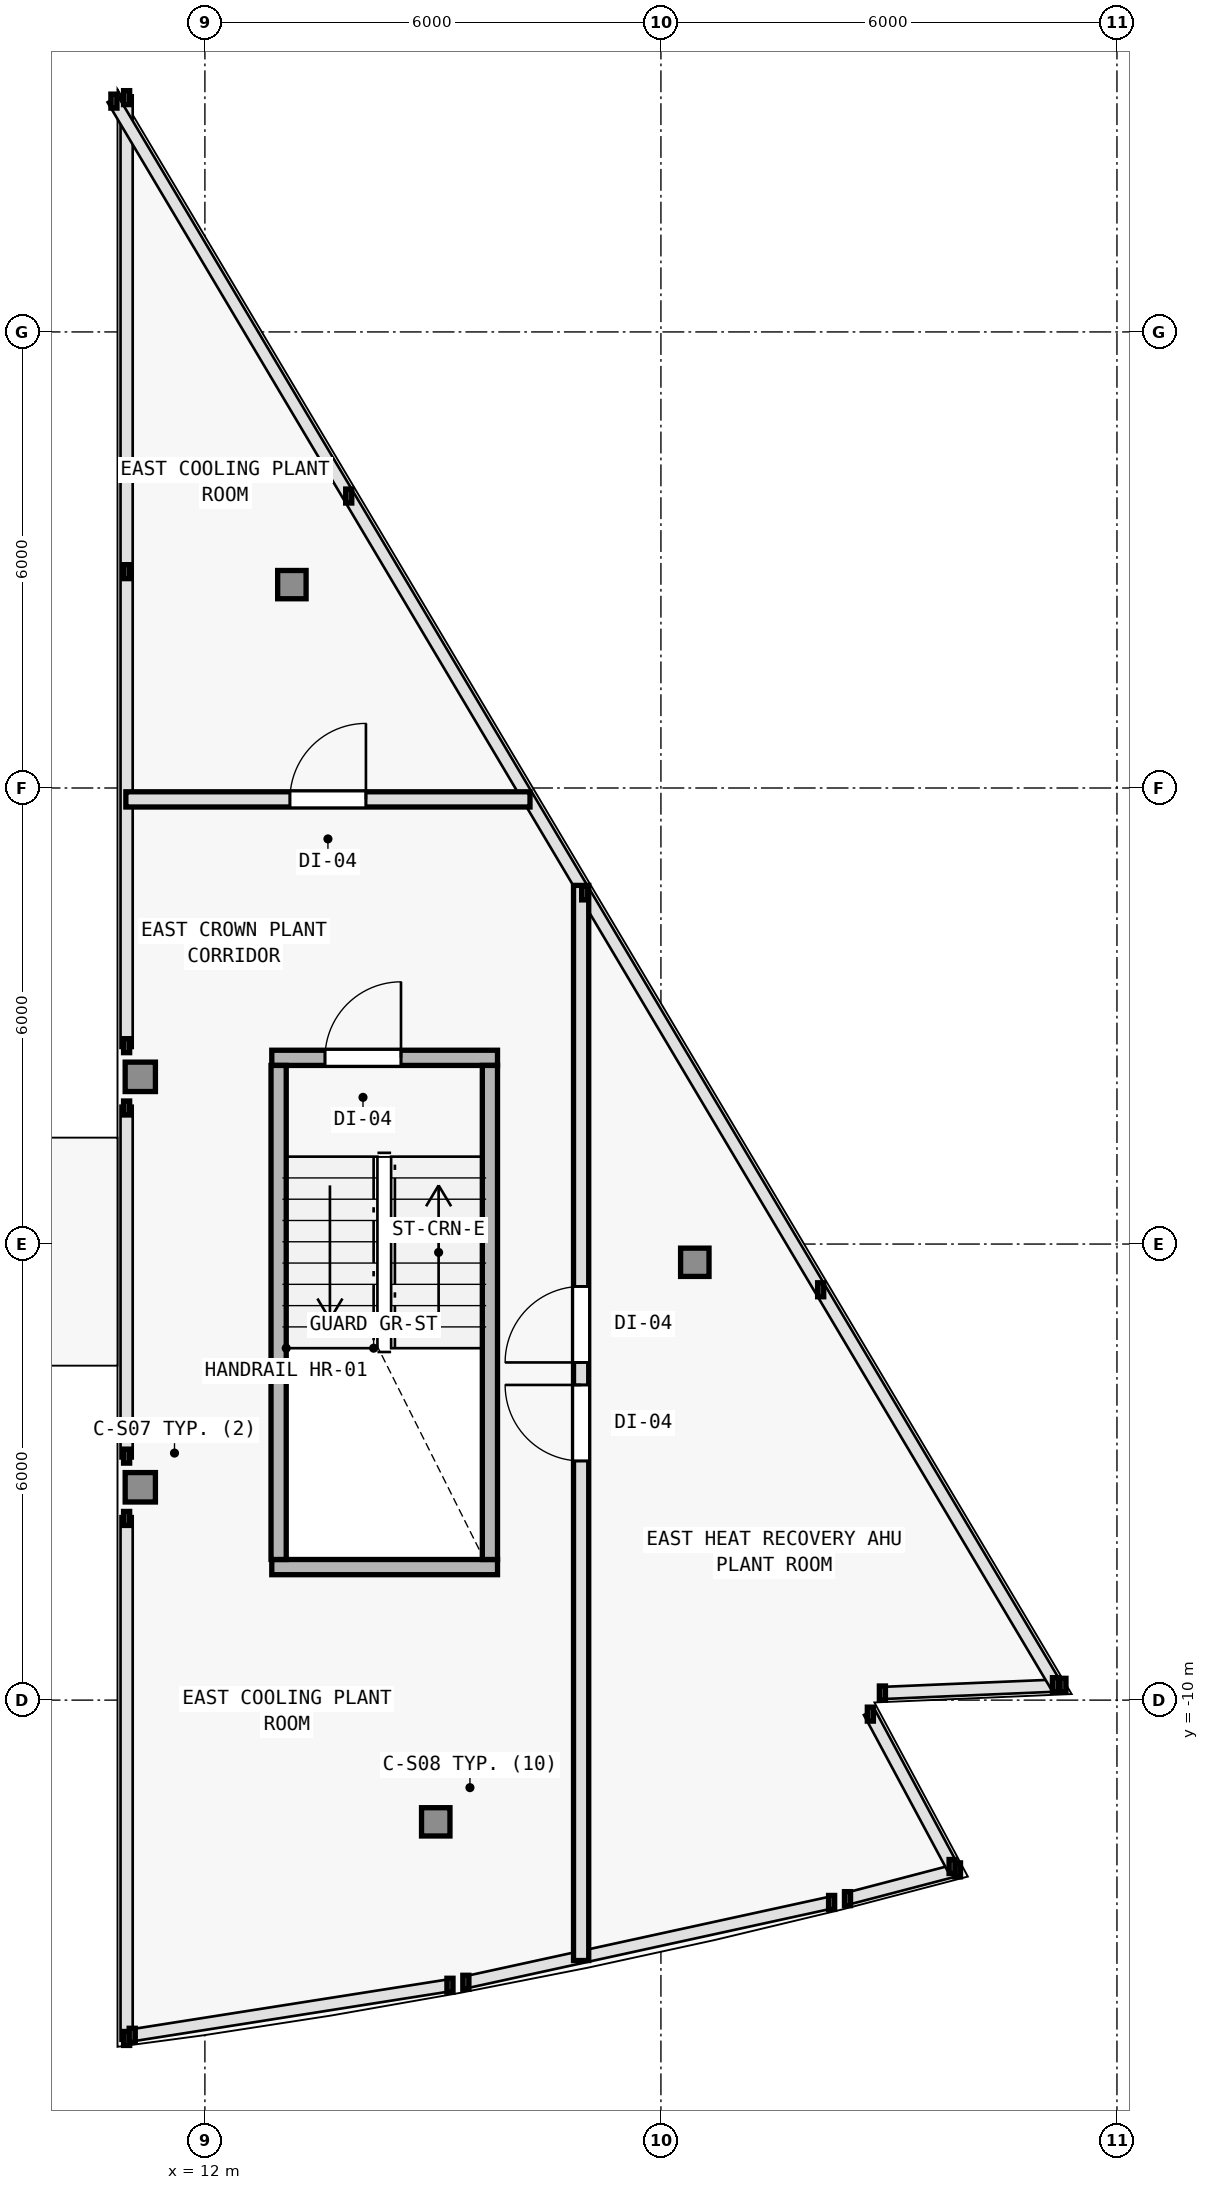
"""IFC4 building model, lengths in metres.
Left out: names, types, materials, properties, quantities, classifications, styles, units other than length and angle.
Written with IfcOpenShell. Run it as: python <this file> out.ifc"""

import sys

from ifc_helpers import new_model, si_unit, direction, frame, frame_2d, origin, origin_2d, place, context, subcontext, project, spatial, rectangle, i_section, extrude, element, fill, save


model = new_model("IFC4")
c1 = context("Model", 3, precision=1e-05, world=origin(), true_north=direction((0.0, 1.0)))
c2 = subcontext(c1, "Body", "Model", "MODEL_VIEW")
j1 = project(units=[si_unit("LENGTHUNIT", "METRE"), si_unit("PLANEANGLEUNIT", "RADIAN")], contexts=[c1])
p1 = place(None, origin())
s1 = spatial("IfcSite", under=j1, at=p1, CompositionType="ELEMENT")
p2 = place(p1, origin())
s2 = spatial("IfcBuilding", under=s1, at=p2, CompositionType="ELEMENT")
p3 = place(p2, frame((0.0, 0.0, 301.2)))
s3 = spatial("IfcBuildingStorey", under=s2, at=p3, CompositionType="ELEMENT", Elevation=301.2)
for number, where, z_axis, x_axis in (
    (1, (11.15, -7.2, 0.0), (0.0, 0.0, 1.0), (1.0, 0.0, 0.0)),
    (2, (11.15, -1.8, 0.0), (0.0, 0.0, 1.0), (1.0, 0.0, 0.0)),
):
    element("IfcColumn", number, at=place(p3, frame(where, z_axis=z_axis, x_axis=x_axis)), inside=s3, PredefinedType="COLUMN", context=c2, shape_type="SweptSolid", body=[
        extrude(i_section(OverallWidth=0.398, OverallDepth=0.387, WebThickness=0.013, FlangeThickness=0.022, FilletRadius=0.015, at=origin_2d()), origin(), (0.0, 0.0, 1.0), 3.6),
    ])
for number, where, z_axis, x_axis in (
    (3, (15.037, -11.602, 0.0), (0.0, 0.0, 1.0), (1.0, 0.0, 0.0)),
    (4, (18.446, -4.24, 0.0), (0.0, 0.0, 1.0), (1.0, 0.0, 0.0)),
    (5, (13.144, 4.676, 0.0), (0.0, 0.0, 1.0), (1.0, 0.0, 0.0)),
):
    element("IfcColumn", number, at=place(p3, frame(where, z_axis=z_axis, x_axis=x_axis)), inside=s3, PredefinedType="COLUMN", context=c2, shape_type="SweptSolid", body=[
        extrude(i_section(OverallWidth=0.374, OverallDepth=0.372, WebThickness=0.012, FlangeThickness=0.02, FilletRadius=0.015, at=origin_2d()), origin(), (0.0, 0.0, 1.0), 3.6),
    ])
p4 = place(p3, frame((12.88, -8.25, 0.0), z_axis=(0.0, 0.0, 1.0), x_axis=(1.0, 0.0, 0.0)))
e6 = element("IfcWall", 6, at=p4, inside=s3, PredefinedType="SOLIDWALL", context=c2, shape_type="SweptSolid", body=[
    extrude(rectangle(XDim=2.97, YDim=0.2, at=frame_2d((1.485, 0.0))), origin(), (0.0, 0.0, 1.0), 3.34),
])
p5 = place(p3, frame((12.88, -1.55, 0.0), z_axis=(0.0, 0.0, 1.0), x_axis=(1.0, 0.0, 0.0)))
e7 = element("IfcWall", 7, at=p5, inside=s3, PredefinedType="SOLIDWALL", context=c2, shape_type="SweptSolid", body=[
    extrude(rectangle(XDim=2.97, YDim=0.2, at=frame_2d((1.485, 0.0))), origin(), (0.0, 0.0, 1.0), 3.34),
])
p6 = place(p5, frame((0.7, 0.0, 0.0)))
e8 = element("IfcOpeningElement", 8, at=p6, cuts=e7, PredefinedType="OPENING", context=c2, shape_type="SweptSolid", body=[
    extrude(rectangle(XDim=1.0, YDim=2.15, at=frame_2d((0.5, 1.075))), frame((0.0, 0.11, 0.0), z_axis=(0.0, -1.0, 0.0), x_axis=(1.0, 0.0, 0.0)), (0.0, 0.0, 1.0), 0.22),
])
for number, where, z_axis, x_axis in (
    (9, (12.97, -8.15, 0.0), (0.0, 0.0, 1.0), (0.0, 1.0, 0.0)),
    (10, (15.75, -8.15, 0.0), (0.0, 0.0, 1.0), (0.0, 1.0, 0.0)),
):
    element("IfcWall", number, at=place(p3, frame(where, z_axis=z_axis, x_axis=x_axis)), inside=s3, PredefinedType="SOLIDWALL", context=c2, shape_type="SweptSolid", body=[
        extrude(rectangle(XDim=6.5, YDim=0.2, at=frame_2d((3.25, 0.0))), origin(), (0.0, 0.0, 1.0), 3.34),
    ])
p7 = place(p3, frame((16.95, -13.426, 0.0), z_axis=(0.0, 0.0, 1.0), x_axis=(0.0, 1.0, 0.0)))
e11 = element("IfcWall", 11, at=p7, inside=s3, PredefinedType="SOLIDWALL", context=c2, shape_type="SweptSolid", body=[
    extrude(rectangle(XDim=14.145, YDim=0.2, at=frame_2d((7.072, 0.0))), origin(), (0.0, 0.0, 1.0), 2.865),
])
p8 = place(p7, frame((6.572, 0.0, 0.0)))
e12 = element("IfcOpeningElement", 12, at=p8, cuts=e11, PredefinedType="OPENING", context=c2, shape_type="SweptSolid", body=[
    extrude(rectangle(XDim=1.0, YDim=2.15, at=frame_2d((0.5, 1.075))), frame((0.0, 0.11, 0.0), z_axis=(0.0, -1.0, 0.0), x_axis=(1.0, 0.0, 0.0)), (0.0, 0.0, 1.0), 0.22),
])
p9 = place(p7, frame((7.868, 0.0, 0.0)))
e13 = element("IfcOpeningElement", 13, at=p9, cuts=e11, PredefinedType="OPENING", context=c2, shape_type="SweptSolid", body=[
    extrude(rectangle(XDim=1.0, YDim=2.15, at=frame_2d((0.5, 1.075))), frame((0.0, 0.11, 0.0), z_axis=(0.0, -1.0, 0.0), x_axis=(1.0, 0.0, 0.0)), (0.0, 0.0, 1.0), 0.22),
])
p10 = place(p3, frame((10.96, 1.85, 0.0), z_axis=(0.0, 0.0, 1.0), x_axis=(1.0, 0.0, 0.0)))
e14 = element("IfcWall", 14, at=p10, inside=s3, PredefinedType="SOLIDWALL", context=c2, shape_type="SweptSolid", body=[
    extrude(rectangle(XDim=5.317, YDim=0.2, at=frame_2d((2.659, 0.0))), origin(), (0.0, 0.0, 1.0), 2.865),
])
p11 = place(p10, frame((2.159, 0.0, 0.0)))
e15 = element("IfcOpeningElement", 15, at=p11, cuts=e14, PredefinedType="OPENING", context=c2, shape_type="SweptSolid", body=[
    extrude(rectangle(XDim=1.0, YDim=2.15, at=frame_2d((0.5, 1.075))), frame((0.0, 0.11, 0.0), z_axis=(0.0, -1.0, 0.0), x_axis=(1.0, 0.0, 0.0)), (0.0, 0.0, 1.0), 0.22),
])
p12 = place(p6, origin())
e16 = element("IfcDoor", 16, at=p12, inside=s3, OperationType="SINGLE_SWING_RIGHT", PredefinedType="DOOR", context=c2, shape_type="SweptSolid", body=[
    extrude(rectangle(XDim=1.0, YDim=2.15, at=frame_2d((0.5, 1.075))), frame((0.0, 0.025, 0.0), z_axis=(0.0, -1.0, 0.0), x_axis=(1.0, 0.0, 0.0)), (0.0, 0.0, 1.0), 0.05),
])
fill(e8, e16)
p13 = place(p8, origin())
e17 = element("IfcDoor", 17, at=p13, inside=s3, OperationType="SINGLE_SWING_RIGHT", PredefinedType="DOOR", context=c2, shape_type="SweptSolid", body=[
    extrude(rectangle(XDim=1.0, YDim=2.15, at=frame_2d((0.5, 1.075))), frame((0.0, 0.025, 0.0), z_axis=(0.0, -1.0, 0.0), x_axis=(1.0, 0.0, 0.0)), (0.0, 0.0, 1.0), 0.05),
])
fill(e12, e17)
p14 = place(p9, origin())
e18 = element("IfcDoor", 18, at=p14, inside=s3, OperationType="SINGLE_SWING_LEFT", PredefinedType="DOOR", context=c2, shape_type="SweptSolid", body=[
    extrude(rectangle(XDim=1.0, YDim=2.15, at=frame_2d((0.5, 1.075))), frame((0.0, 0.025, 0.0), z_axis=(0.0, -1.0, 0.0), x_axis=(1.0, 0.0, 0.0)), (0.0, 0.0, 1.0), 0.05),
])
fill(e13, e18)
p15 = place(p11, origin())
e19 = element("IfcDoor", 19, at=p15, inside=s3, OperationType="SINGLE_SWING_RIGHT", PredefinedType="DOOR", context=c2, shape_type="SweptSolid", body=[
    extrude(rectangle(XDim=1.0, YDim=2.15, at=frame_2d((0.5, 1.075))), frame((0.0, 0.025, 0.0), z_axis=(0.0, -1.0, 0.0), x_axis=(1.0, 0.0, 0.0)), (0.0, 0.0, 1.0), 0.05),
])
fill(e15, e19)
save(model, sys.argv[1])
